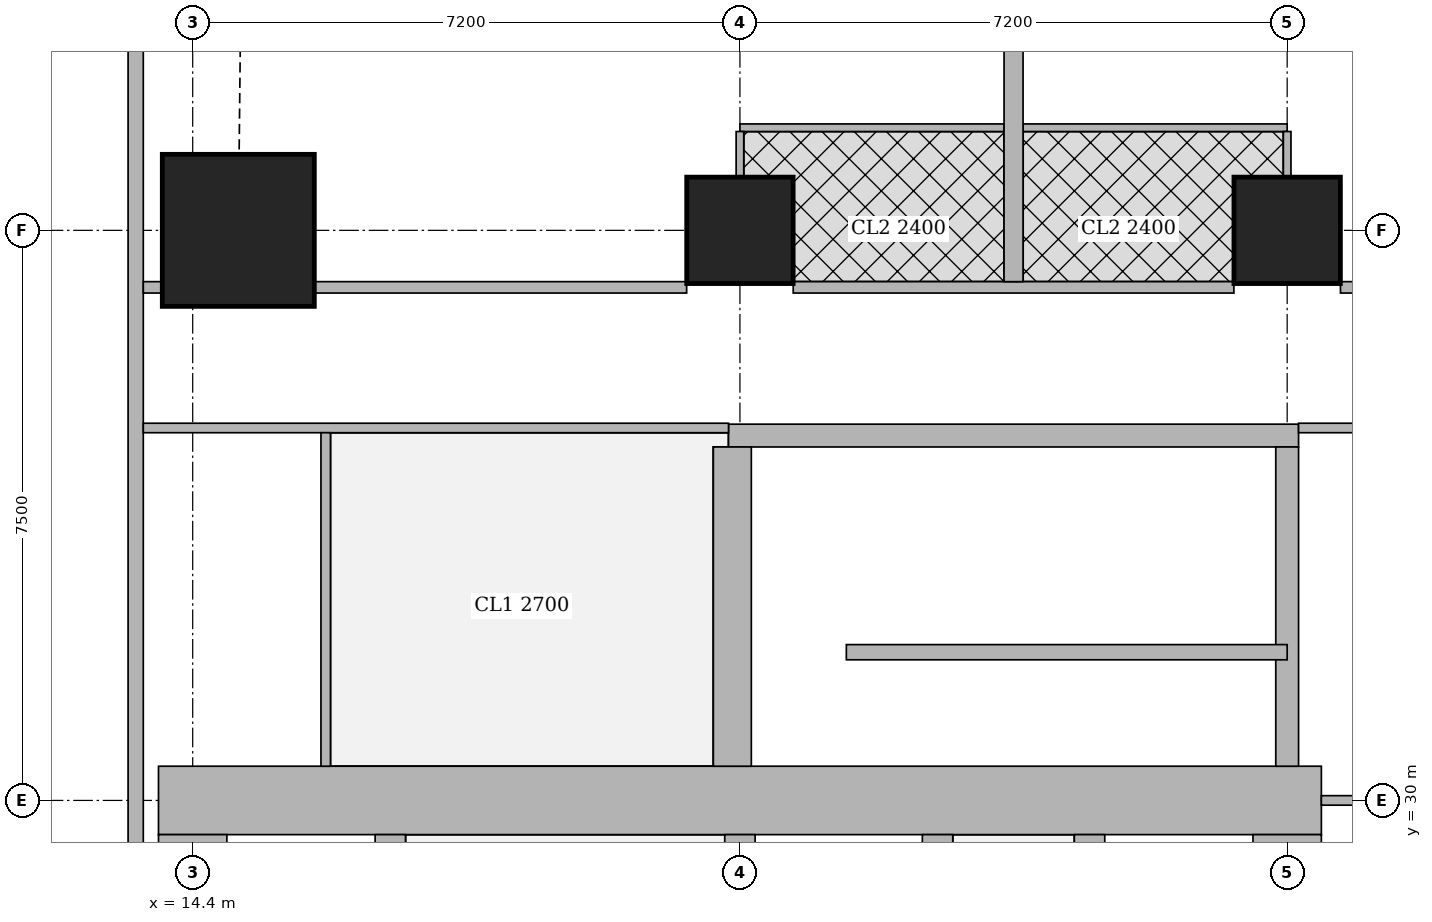
"""IFC4 building model, lengths in metres.
Left out: names, types, materials, properties, quantities, classifications, styles, units other than length and angle.
Written with IfcOpenShell. Run it as: python <this file> out.ifc"""

import sys

from ifc_helpers import new_model, si_unit, direction, frame, frame_2d, origin, origin_2d, place, context, subcontext, project, spatial, rectangle, extrude, element, fill, save


model = new_model("IFC4")
c1 = context("Model", 3, precision=1e-05, world=origin(), true_north=direction((0.0, 1.0)))
c2 = subcontext(c1, "Body", "Model", "MODEL_VIEW")
j1 = project(units=[si_unit("LENGTHUNIT", "METRE"), si_unit("PLANEANGLEUNIT", "RADIAN")], contexts=[c1])
p1 = place(None, origin())
s1 = spatial("IfcSite", under=j1, at=p1, CompositionType="ELEMENT")
p2 = place(p1, origin())
s2 = spatial("IfcBuilding", under=s1, at=p2, CompositionType="ELEMENT")
p3 = place(p2, frame((0.0, 0.0, 251.6)))
s3 = spatial("IfcBuildingStorey", under=s2, at=p3, CompositionType="ELEMENT", Elevation=251.6)
p4 = place(p3, frame((15.0, 37.5, 0.0), z_axis=(0.0, 0.0, 1.0), x_axis=(1.0, 0.0, 0.0)))
e1 = element("IfcColumn", 1, at=p4, inside=s3, PredefinedType="COLUMN", context=c2, shape_type="SweptSolid", body=[
    extrude(rectangle(XDim=2.0, YDim=2.0, at=origin_2d()), origin(), (0.0, 0.0, 1.0), 3.75),
])
for number, where, z_axis, x_axis in (
    (2, (21.6, 37.5, 0.0), (0.0, 0.0, 1.0), (1.0, 0.0, 0.0)),
    (3, (28.8, 37.5, 0.0), (0.0, 0.0, 1.0), (1.0, 0.0, 0.0)),
):
    element("IfcColumn", number, at=place(p3, frame(where, z_axis=z_axis, x_axis=x_axis)), inside=s3, PredefinedType="COLUMN", context=c2, shape_type="SweptSolid", body=[
        extrude(rectangle(XDim=1.4, YDim=1.4, at=origin_2d()), origin(), (0.0, 0.0, 1.0), 3.75),
    ])
p5 = place(p3, frame((13.95, 30.0, 0.0), z_axis=(0.0, 0.0, 1.0), x_axis=(1.0, 0.0, 0.0)))
e4 = element("IfcWall", 4, at=p5, inside=s3, PredefinedType="SHEAR", context=c2, shape_type="SweptSolid", body=[
    extrude(rectangle(XDim=15.3, YDim=0.9, at=frame_2d((7.65, 0.0))), origin(), (0.0, 0.0, 1.0), 3.75),
])
p6 = place(p5, frame((4.45, 0.0, 0.0)))
e5 = element("IfcOpeningElement", 5, at=p6, cuts=e4, PredefinedType="OPENING", context=c2, shape_type="SweptSolid", body=[
    extrude(rectangle(XDim=1.8, YDim=2.1, at=frame_2d((0.9, 1.05))), frame((0.0, 0.46, 0.0), z_axis=(0.0, -1.0, 0.0), x_axis=(1.0, 0.0, 0.0)), (0.0, 0.0, 1.0), 0.92),
])
p7 = place(p5, frame((10.7, 0.0, 0.0)))
e6 = element("IfcOpeningElement", 6, at=p7, cuts=e4, PredefinedType="OPENING", context=c2, shape_type="SweptSolid", body=[
    extrude(rectangle(XDim=1.1, YDim=2.1, at=frame_2d((0.55, 1.05))), frame((0.0, 0.46, 0.0), z_axis=(0.0, -1.0, 0.0), x_axis=(1.0, 0.0, 0.0)), (0.0, 0.0, 1.0), 0.92),
])
for number, where, z_axis, x_axis in (
    (7, (14.4, 15.45, 0.0), (0.0, 0.0, 1.0), (0.0, 1.0, 0.0)),
    (8, (28.8, 15.45, 0.0), (0.0, 0.0, 1.0), (0.0, 1.0, 0.0)),
):
    element("IfcWall", number, at=place(p3, frame(where, z_axis=z_axis, x_axis=x_axis)), inside=s3, PredefinedType="SHEAR", context=c2, shape_type="SweptSolid", body=[
        extrude(rectangle(XDim=14.1, YDim=0.9, at=frame_2d((7.05, 0.0))), origin(), (0.0, 0.0, 1.0), 3.75),
    ])
p8 = place(p3, frame((17.0, 15.45, 0.0), z_axis=(0.0, 0.0, 1.0), x_axis=(0.0, 1.0, 0.0)))
e9 = element("IfcWall", 9, at=p8, inside=s3, PredefinedType="SHEAR", context=c2, shape_type="SweptSolid", body=[
    extrude(rectangle(XDim=14.1, YDim=0.4, at=frame_2d((7.05, 0.0))), origin(), (0.0, 0.0, 1.0), 3.75),
])
p9 = place(p8, frame((1.05, 0.0, 0.0)))
e10 = element("IfcOpeningElement", 10, at=p9, cuts=e9, PredefinedType="OPENING", context=c2, shape_type="SweptSolid", body=[
    extrude(rectangle(XDim=1.0, YDim=2.1, at=frame_2d((0.5, 1.05))), frame((0.0, 0.21, 0.0), z_axis=(0.0, -1.0, 0.0), x_axis=(1.0, 0.0, 0.0)), (0.0, 0.0, 1.0), 0.42),
])
p10 = place(p8, frame((4.675, 0.0, 0.0)))
e11 = element("IfcOpeningElement", 11, at=p10, cuts=e9, PredefinedType="OPENING", context=c2, shape_type="SweptSolid", body=[
    extrude(rectangle(XDim=1.0, YDim=2.1, at=frame_2d((0.5, 1.05))), frame((0.0, 0.21, 0.0), z_axis=(0.0, -1.0, 0.0), x_axis=(1.0, 0.0, 0.0)), (0.0, 0.0, 1.0), 0.42),
])
p11 = place(p8, frame((8.425, 0.0, 0.0)))
e12 = element("IfcOpeningElement", 12, at=p11, cuts=e9, PredefinedType="OPENING", context=c2, shape_type="SweptSolid", body=[
    extrude(rectangle(XDim=1.0, YDim=2.1, at=frame_2d((0.5, 1.05))), frame((0.0, 0.21, 0.0), z_axis=(0.0, -1.0, 0.0), x_axis=(1.0, 0.0, 0.0)), (0.0, 0.0, 1.0), 0.42),
])
p12 = place(p8, frame((12.175, 0.0, 0.0)))
e13 = element("IfcOpeningElement", 13, at=p12, cuts=e9, PredefinedType="OPENING", context=c2, shape_type="SweptSolid", body=[
    extrude(rectangle(XDim=1.0, YDim=2.1, at=frame_2d((0.5, 1.05))), frame((0.0, 0.21, 0.0), z_axis=(0.0, -1.0, 0.0), x_axis=(1.0, 0.0, 0.0)), (0.0, 0.0, 1.0), 0.42),
])
p13 = place(p3, frame((21.6, 15.45, 0.0), z_axis=(0.0, 0.0, 1.0), x_axis=(0.0, 1.0, 0.0)))
e14 = element("IfcWall", 14, at=p13, inside=s3, PredefinedType="SHEAR", context=c2, shape_type="SweptSolid", body=[
    extrude(rectangle(XDim=14.1, YDim=0.4, at=frame_2d((7.05, 0.0))), origin(), (0.0, 0.0, 1.0), 3.75),
])
p14 = place(p13, frame((0.875, 0.0, 0.0)))
e15 = element("IfcOpeningElement", 15, at=p14, cuts=e14, PredefinedType="OPENING", context=c2, shape_type="SweptSolid", body=[
    extrude(rectangle(XDim=1.1, YDim=2.1, at=frame_2d((0.55, 1.05))), frame((0.0, 0.21, 0.0), z_axis=(0.0, -1.0, 0.0), x_axis=(1.0, 0.0, 0.0)), (0.0, 0.0, 1.0), 0.42),
])
p15 = place(p13, frame((4.625, 0.0, 0.0)))
e16 = element("IfcOpeningElement", 16, at=p15, cuts=e14, PredefinedType="OPENING", context=c2, shape_type="SweptSolid", body=[
    extrude(rectangle(XDim=1.1, YDim=2.1, at=frame_2d((0.55, 1.05))), frame((0.0, 0.21, 0.0), z_axis=(0.0, -1.0, 0.0), x_axis=(1.0, 0.0, 0.0)), (0.0, 0.0, 1.0), 0.42),
])
p16 = place(p13, frame((8.375, 0.0, 0.0)))
e17 = element("IfcOpeningElement", 17, at=p16, cuts=e14, PredefinedType="OPENING", context=c2, shape_type="SweptSolid", body=[
    extrude(rectangle(XDim=1.1, YDim=2.1, at=frame_2d((0.55, 1.05))), frame((0.0, 0.21, 0.0), z_axis=(0.0, -1.0, 0.0), x_axis=(1.0, 0.0, 0.0)), (0.0, 0.0, 1.0), 0.42),
])
p17 = place(p13, frame((12.125, 0.0, 0.0)))
e18 = element("IfcOpeningElement", 18, at=p17, cuts=e14, PredefinedType="OPENING", context=c2, shape_type="SweptSolid", body=[
    extrude(rectangle(XDim=1.1, YDim=2.1, at=frame_2d((0.55, 1.05))), frame((0.0, 0.21, 0.0), z_axis=(0.0, -1.0, 0.0), x_axis=(1.0, 0.0, 0.0)), (0.0, 0.0, 1.0), 0.42),
])
p18 = place(p3, frame((24.2, 15.45, 0.0), z_axis=(0.0, 0.0, 1.0), x_axis=(0.0, 1.0, 0.0)))
e19 = element("IfcWall", 19, at=p18, inside=s3, PredefinedType="SHEAR", context=c2, shape_type="SweptSolid", body=[
    extrude(rectangle(XDim=14.1, YDim=0.4, at=frame_2d((7.05, 0.0))), origin(), (0.0, 0.0, 1.0), 3.75),
])
p19 = place(p3, frame((26.2, 26.45, 0.0), z_axis=(0.0, 0.0, 1.0), x_axis=(0.0, 1.0, 0.0)))
e20 = element("IfcWall", 20, at=p19, inside=s3, PredefinedType="SHEAR", context=c2, shape_type="SweptSolid", body=[
    extrude(rectangle(XDim=3.1, YDim=0.4, at=frame_2d((1.55, 0.0))), origin(), (0.0, 0.0, 1.0), 3.75),
])
p20 = place(p19, frame((1.075, 0.0, 0.0)))
e21 = element("IfcOpeningElement", 21, at=p20, cuts=e20, PredefinedType="OPENING", context=c2, shape_type="SweptSolid", body=[
    extrude(rectangle(XDim=1.2, YDim=2.1, at=frame_2d((0.6, 1.05))), frame((0.0, 0.21, 0.0), z_axis=(0.0, -1.0, 0.0), x_axis=(1.0, 0.0, 0.0)), (0.0, 0.0, 1.0), 0.42),
])
p21 = place(p3, frame((21.45, 34.8, 0.0), z_axis=(0.0, 0.0, 1.0), x_axis=(1.0, 0.0, 0.0)))
e22 = element("IfcWall", 22, at=p21, inside=s3, PredefinedType="SHEAR", context=c2, shape_type="SweptSolid", body=[
    extrude(rectangle(XDim=7.5, YDim=0.3, at=frame_2d((3.75, 0.0))), origin(), (0.0, 0.0, 1.0), 3.75),
])
p22 = place(p21, frame((0.5, 0.0, 0.0)))
e23 = element("IfcOpeningElement", 23, at=p22, cuts=e22, PredefinedType="OPENING", context=c2, shape_type="SweptSolid", body=[
    extrude(rectangle(XDim=1.1, YDim=2.1, at=frame_2d((0.55, 1.05))), frame((0.0, 0.16, 0.0), z_axis=(0.0, -1.0, 0.0), x_axis=(1.0, 0.0, 0.0)), (0.0, 0.0, 1.0), 0.32),
])
p23 = place(p3, frame((21.5, 30.45, 0.0), z_axis=(0.0, 0.0, 1.0), x_axis=(0.0, 1.0, 0.0)))
e24 = element("IfcWall", 24, at=p23, inside=s3, PredefinedType="SHEAR", context=c2, shape_type="SweptSolid", body=[
    extrude(rectangle(XDim=4.2, YDim=0.5, at=frame_2d((2.1, 0.0))), origin(), (0.0, 0.0, 1.0), 3.75),
])
p24 = place(p3, frame((28.8, 30.45, 0.0), z_axis=(0.0, 0.0, 1.0), x_axis=(0.0, 1.0, 0.0)))
e25 = element("IfcWall", 25, at=p24, inside=s3, PredefinedType="SHEAR", context=c2, shape_type="SweptSolid", body=[
    extrude(rectangle(XDim=4.2, YDim=0.3, at=frame_2d((2.1, 0.0))), origin(), (0.0, 0.0, 1.0), 3.75),
])
p25 = place(p3, frame((13.65, 43.037, 0.0), z_axis=(0.0, 0.0, 1.0), x_axis=(0.0, -1.0, 0.0)))
e26 = element("IfcWall", 26, at=p25, inside=s3, PredefinedType="SOLIDWALL", context=c2, shape_type="SweptSolid", body=[
    extrude(rectangle(XDim=35.374, YDim=0.2, at=frame_2d((17.687, 0.0))), origin(), (0.0, 0.0, 1.0), 3.5),
])
p26 = place(p25, frame((1.959, 0.0, 0.9)))
e27 = element("IfcOpeningElement", 27, at=p26, cuts=e26, PredefinedType="OPENING", context=c2, shape_type="SweptSolid", body=[
    extrude(rectangle(XDim=1.8, YDim=1.5, at=frame_2d((0.9, 0.75))), frame((0.0, 0.11, 0.0), z_axis=(0.0, -1.0, 0.0), x_axis=(1.0, 0.0, 0.0)), (0.0, 0.0, 1.0), 0.22),
])
p27 = place(p3, frame((13.75, 36.75, 0.0), z_axis=(0.0, 0.0, 1.0), x_axis=(1.0, 0.0, 0.0)))
e28 = element("IfcWall", 28, at=p27, inside=s3, PredefinedType="SOLIDWALL", context=c2, shape_type="SweptSolid", body=[
    extrude(rectangle(XDim=0.249, YDim=0.15, at=frame_2d((0.125, 0.0))), origin(), (0.0, 0.0, 1.0), 3.5),
])
p28 = place(p3, frame((16.001, 36.75, 0.0), z_axis=(0.0, 0.0, 1.0), x_axis=(1.0, 0.0, 0.0)))
e29 = element("IfcWall", 29, at=p28, inside=s3, PredefinedType="SOLIDWALL", context=c2, shape_type="SweptSolid", body=[
    extrude(rectangle(XDim=4.898, YDim=0.15, at=frame_2d((2.449, 0.0))), origin(), (0.0, 0.0, 1.0), 3.5),
])
p29 = place(p28, frame((1.074, 0.0, 0.0)))
e30 = element("IfcOpeningElement", 30, at=p29, cuts=e29, PredefinedType="OPENING", context=c2, shape_type="SweptSolid", body=[
    extrude(rectangle(XDim=1.0, YDim=2.1, at=frame_2d((0.5, 1.05))), frame((0.0, 0.085, 0.0), z_axis=(0.0, -1.0, 0.0), x_axis=(1.0, 0.0, 0.0)), (0.0, 0.0, 1.0), 0.17),
])
p30 = place(p3, frame((22.301, 36.75, 0.0), z_axis=(0.0, 0.0, 1.0), x_axis=(1.0, 0.0, 0.0)))
e31 = element("IfcWall", 31, at=p30, inside=s3, PredefinedType="SOLIDWALL", context=c2, shape_type="SweptSolid", body=[
    extrude(rectangle(XDim=5.798, YDim=0.15, at=frame_2d((2.899, 0.0))), origin(), (0.0, 0.0, 1.0), 3.5),
])
p31 = place(p3, frame((29.501, 36.75, 0.0), z_axis=(0.0, 0.0, 1.0), x_axis=(1.0, 0.0, 0.0)))
e32 = element("IfcWall", 32, at=p31, inside=s3, PredefinedType="SOLIDWALL", context=c2, shape_type="SweptSolid", body=[
    extrude(rectangle(XDim=5.216, YDim=0.15, at=frame_2d((2.608, 0.0))), origin(), (0.0, 0.0, 1.0), 3.5),
])
p32 = place(p31, frame((1.803, 0.0, 0.0)))
e33 = element("IfcOpeningElement", 33, at=p32, cuts=e32, PredefinedType="OPENING", context=c2, shape_type="SweptSolid", body=[
    extrude(rectangle(XDim=1.0, YDim=2.1, at=frame_2d((0.5, 1.05))), frame((0.0, 0.085, 0.0), z_axis=(0.0, -1.0, 0.0), x_axis=(1.0, 0.0, 0.0)), (0.0, 0.0, 1.0), 0.17),
])
p33 = place(p3, frame((21.6, 38.85, 0.0), z_axis=(0.0, 0.0, 1.0), x_axis=(1.0, 0.0, 0.0)))
e34 = element("IfcWall", 34, at=p33, inside=s3, PredefinedType="PARTITIONING", context=c2, shape_type="SweptSolid", body=[
    extrude(rectangle(XDim=3.475, YDim=0.1, at=frame_2d((1.737, 0.0))), origin(), (0.0, 0.0, 1.0), 3.5),
])
p34 = place(p33, frame((1.35, 0.0, 0.0)))
e35 = element("IfcOpeningElement", 35, at=p34, cuts=e34, PredefinedType="OPENING", context=c2, shape_type="SweptSolid", body=[
    extrude(rectangle(XDim=0.9, YDim=2.1, at=frame_2d((0.45, 1.05))), frame((0.0, 0.06, 0.0), z_axis=(0.0, -1.0, 0.0), x_axis=(1.0, 0.0, 0.0)), (0.0, 0.0, 1.0), 0.12),
])
p35 = place(p3, frame((21.6, 38.201, 0.0), z_axis=(0.0, 0.0, 1.0), x_axis=(0.0, 1.0, 0.0)))
e36 = element("IfcWall", 36, at=p35, inside=s3, PredefinedType="PARTITIONING", context=c2, shape_type="SweptSolid", body=[
    extrude(rectangle(XDim=0.599, YDim=0.1, at=frame_2d((0.3, 0.0))), origin(), (0.0, 0.0, 1.0), 3.5),
])
p36 = place(p3, frame((25.325, 38.85, 0.0), z_axis=(0.0, 0.0, 1.0), x_axis=(1.0, 0.0, 0.0)))
e37 = element("IfcWall", 37, at=p36, inside=s3, PredefinedType="PARTITIONING", context=c2, shape_type="SweptSolid", body=[
    extrude(rectangle(XDim=3.475, YDim=0.1, at=frame_2d((1.738, 0.0))), origin(), (0.0, 0.0, 1.0), 3.5),
])
p37 = place(p36, frame((1.225, 0.0, 0.0)))
e38 = element("IfcOpeningElement", 38, at=p37, cuts=e37, PredefinedType="OPENING", context=c2, shape_type="SweptSolid", body=[
    extrude(rectangle(XDim=0.9, YDim=2.1, at=frame_2d((0.45, 1.05))), frame((0.0, 0.06, 0.0), z_axis=(0.0, -1.0, 0.0), x_axis=(1.0, 0.0, 0.0)), (0.0, 0.0, 1.0), 0.12),
])
p38 = place(p3, frame((28.8, 38.201, 0.0), z_axis=(0.0, 0.0, 1.0), x_axis=(0.0, 1.0, 0.0)))
e39 = element("IfcWall", 39, at=p38, inside=s3, PredefinedType="PARTITIONING", context=c2, shape_type="SweptSolid", body=[
    extrude(rectangle(XDim=0.599, YDim=0.1, at=frame_2d((0.3, 0.0))), origin(), (0.0, 0.0, 1.0), 3.5),
])
p39 = place(p3, frame((25.2, 36.825, 0.0), z_axis=(0.0, 0.0, 1.0), x_axis=(0.0, 1.0, 0.0)))
e40 = element("IfcWall", 40, at=p39, inside=s3, PredefinedType="SOLIDWALL", context=c2, shape_type="SweptSolid", body=[
    extrude(rectangle(XDim=3.225, YDim=0.25, at=frame_2d((1.613, 0.0))), origin(), (0.0, 0.0, 1.0), 3.5),
])
p40 = place(p3, frame((13.75, 34.9, 0.0), z_axis=(0.0, 0.0, 1.0), x_axis=(1.0, 0.0, 0.0)))
e41 = element("IfcWall", 41, at=p40, inside=s3, PredefinedType="PARTITIONING", context=c2, shape_type="SweptSolid", body=[
    extrude(rectangle(XDim=7.7, YDim=0.125, at=frame_2d((3.85, 0.0))), origin(), (0.0, 0.0, 1.0), 3.5),
])
p41 = place(p40, frame((4.15, 0.0, 0.0)))
e42 = element("IfcOpeningElement", 42, at=p41, cuts=e41, PredefinedType="OPENING", context=c2, shape_type="SweptSolid", body=[
    extrude(rectangle(XDim=1.8, YDim=2.1, at=frame_2d((0.9, 1.05))), frame((0.0, 0.073, 0.0), z_axis=(0.0, -1.0, 0.0), x_axis=(1.0, 0.0, 0.0)), (0.0, 0.0, 1.0), 0.145),
])
p42 = place(p3, frame((16.15, 30.45, 0.0), z_axis=(0.0, 0.0, 1.0), x_axis=(0.0, 1.0, 0.0)))
e43 = element("IfcWall", 43, at=p42, inside=s3, PredefinedType="PARTITIONING", context=c2, shape_type="SweptSolid", body=[
    extrude(rectangle(XDim=4.387, YDim=0.125, at=frame_2d((2.193, 0.0))), origin(), (0.0, 0.0, 1.0), 3.5),
])
p43 = place(p42, frame((1.75, 0.0, 0.0)))
e44 = element("IfcOpeningElement", 44, at=p43, cuts=e43, PredefinedType="OPENING", context=c2, shape_type="SweptSolid", body=[
    extrude(rectangle(XDim=1.0, YDim=2.1, at=frame_2d((0.5, 1.05))), frame((0.0, 0.073, 0.0), z_axis=(0.0, -1.0, 0.0), x_axis=(1.0, 0.0, 0.0)), (0.0, 0.0, 1.0), 0.145),
])
p44 = place(p3, frame((28.95, 34.9, 0.0), z_axis=(0.0, 0.0, 1.0), x_axis=(1.0, 0.0, 0.0)))
e45 = element("IfcWall", 45, at=p44, inside=s3, PredefinedType="PARTITIONING", context=c2, shape_type="SweptSolid", body=[
    extrude(rectangle(XDim=4.334, YDim=0.125, at=frame_2d((2.167, 0.0))), origin(), (0.0, 0.0, 1.0), 3.5),
])
p45 = place(p3, frame((29.25, 30.0, 0.0), z_axis=(0.0, 0.0, 1.0), x_axis=(1.0, 0.0, 0.0)))
e46 = element("IfcWall", 46, at=p45, inside=s3, PredefinedType="PARTITIONING", context=c2, shape_type="SweptSolid", body=[
    extrude(rectangle(XDim=3.049, YDim=0.125, at=frame_2d((1.524, 0.0))), origin(), (0.0, 0.0, 1.0), 3.5),
])
p46 = place(p3, frame((23.0, 31.95, 0.0), z_axis=(0.0, 0.0, 1.0), x_axis=(1.0, 0.0, 0.0)))
e47 = element("IfcWall", 47, at=p46, inside=s3, PredefinedType="SHEAR", context=c2, shape_type="SweptSolid", body=[
    extrude(rectangle(XDim=5.8, YDim=0.2, at=frame_2d((2.9, 0.0))), origin(), (0.0, 0.0, 1.0), 3.75),
])
p47 = place(p26, origin())
e48 = element("IfcWindow", 48, at=p47, inside=s3, PartitioningType="SINGLE_PANEL", PredefinedType="WINDOW", context=c2, shape_type="SweptSolid", body=[
    extrude(rectangle(XDim=1.8, YDim=1.5, at=frame_2d((0.9, 0.75))), frame((0.0, 0.03, 0.0), z_axis=(0.0, -1.0, 0.0), x_axis=(1.0, 0.0, 0.0)), (0.0, 0.0, 1.0), 0.06),
])
fill(e27, e48)
p48 = place(p34, origin())
e49 = element("IfcDoor", 49, at=p48, inside=s3, OperationType="SINGLE_SWING_LEFT", PredefinedType="DOOR", context=c2, shape_type="SweptSolid", body=[
    extrude(rectangle(XDim=0.9, YDim=2.1, at=frame_2d((0.45, 1.05))), frame((0.0, 0.025, 0.0), z_axis=(0.0, -1.0, 0.0), x_axis=(1.0, 0.0, 0.0)), (0.0, 0.0, 1.0), 0.05),
])
fill(e35, e49)
p49 = place(p29, origin())
e50 = element("IfcDoor", 50, at=p49, inside=s3, OperationType="SINGLE_SWING_LEFT", PredefinedType="DOOR", context=c2, shape_type="SweptSolid", body=[
    extrude(rectangle(XDim=1.0, YDim=2.1, at=frame_2d((0.5, 1.05))), frame((0.0, 0.025, 0.0), z_axis=(0.0, -1.0, 0.0), x_axis=(1.0, 0.0, 0.0)), (0.0, 0.0, 1.0), 0.05),
])
fill(e30, e50)
p50 = place(p37, origin())
e51 = element("IfcDoor", 51, at=p50, inside=s3, OperationType="SINGLE_SWING_RIGHT", PredefinedType="DOOR", context=c2, shape_type="SweptSolid", body=[
    extrude(rectangle(XDim=0.9, YDim=2.1, at=frame_2d((0.45, 1.05))), frame((0.0, 0.025, 0.0), z_axis=(0.0, -1.0, 0.0), x_axis=(1.0, 0.0, 0.0)), (0.0, 0.0, 1.0), 0.05),
])
fill(e38, e51)
p51 = place(p43, origin())
e52 = element("IfcDoor", 52, at=p51, inside=s3, OperationType="SINGLE_SWING_RIGHT", PredefinedType="DOOR", context=c2, shape_type="SweptSolid", body=[
    extrude(rectangle(XDim=1.0, YDim=2.1, at=frame_2d((0.5, 1.05))), frame((0.0, 0.025, 0.0), z_axis=(0.0, -1.0, 0.0), x_axis=(1.0, 0.0, 0.0)), (0.0, 0.0, 1.0), 0.05),
])
fill(e44, e52)
p52 = place(p41, origin())
e53 = element("IfcDoor", 53, at=p52, inside=s3, OperationType="DOUBLE_DOOR_SINGLE_SWING", PredefinedType="DOOR", context=c2, shape_type="SweptSolid", body=[
    extrude(rectangle(XDim=1.8, YDim=2.1, at=frame_2d((0.9, 1.05))), frame((0.0, 0.025, 0.0), z_axis=(0.0, -1.0, 0.0), x_axis=(1.0, 0.0, 0.0)), (0.0, 0.0, 1.0), 0.05),
])
fill(e42, e53)
p53 = place(p6, origin())
e54 = element("IfcDoor", 54, at=p53, inside=s3, OperationType="DOUBLE_DOOR_SINGLE_SWING", PredefinedType="DOOR", context=c2, shape_type="SweptSolid", body=[
    extrude(rectangle(XDim=1.8, YDim=2.1, at=frame_2d((0.9, 1.05))), frame((0.0, 0.025, 0.0), z_axis=(0.0, -1.0, 0.0), x_axis=(1.0, 0.0, 0.0)), (0.0, 0.0, 1.0), 0.05),
])
fill(e5, e54)
p54 = place(p7, origin())
e55 = element("IfcDoor", 55, at=p54, inside=s3, OperationType="SINGLE_SWING_LEFT", PredefinedType="DOOR", context=c2, shape_type="SweptSolid", body=[
    extrude(rectangle(XDim=1.1, YDim=2.1, at=frame_2d((0.55, 1.05))), frame((0.0, 0.025, 0.0), z_axis=(0.0, -1.0, 0.0), x_axis=(1.0, 0.0, 0.0)), (0.0, 0.0, 1.0), 0.05),
])
fill(e6, e55)
p55 = place(p22, origin())
e56 = element("IfcDoor", 56, at=p55, inside=s3, OperationType="SINGLE_SWING_RIGHT", PredefinedType="DOOR", context=c2, shape_type="SweptSolid", body=[
    extrude(rectangle(XDim=1.1, YDim=2.1, at=frame_2d((0.55, 1.05))), frame((0.0, 0.025, 0.0), z_axis=(0.0, -1.0, 0.0), x_axis=(1.0, 0.0, 0.0)), (0.0, 0.0, 1.0), 0.05),
])
fill(e23, e56)
save(model, sys.argv[1])
